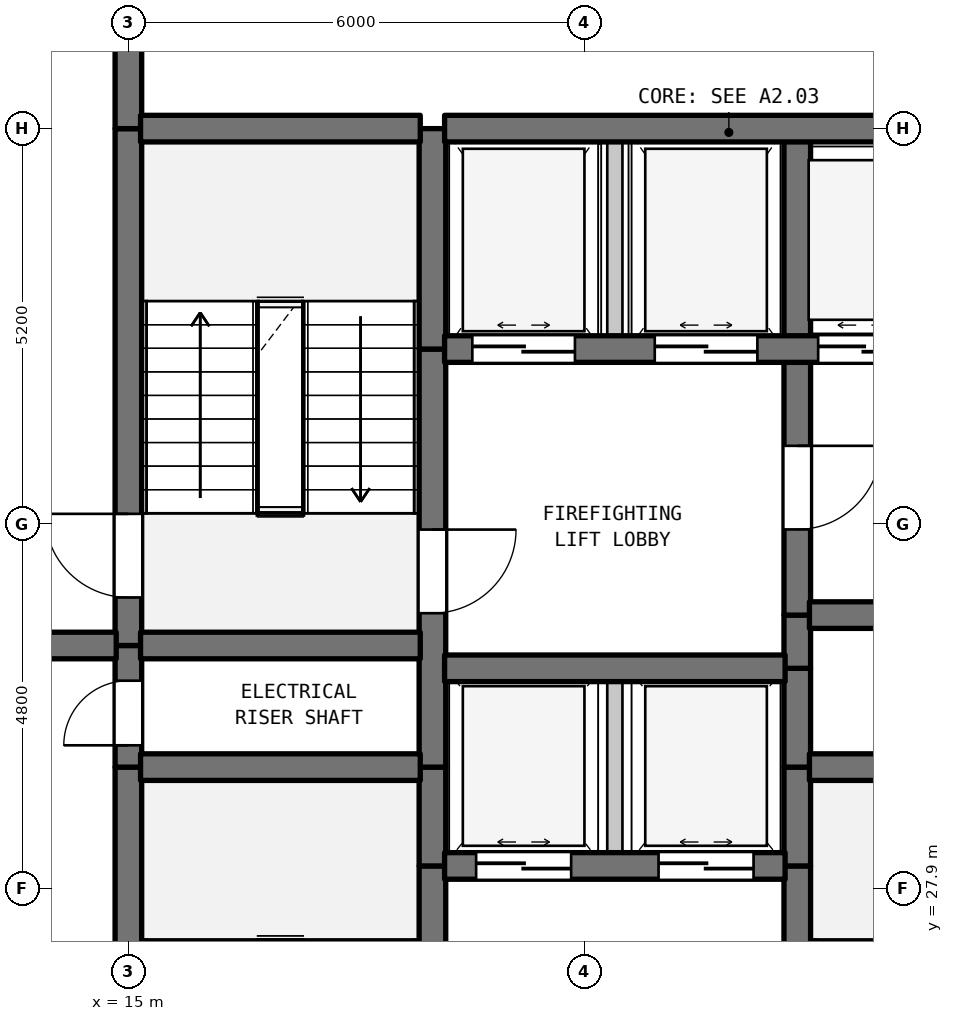
"""IFC4 building model, lengths in metres.
Left out: names, types, materials, properties, quantities, classifications, styles, units other than length and angle.
Written with IfcOpenShell. Run it as: python <this file> out.ifc"""

import sys

from ifc_helpers import new_model, si_unit, direction, frame, frame_2d, origin, place, context, subcontext, project, spatial, rectangle, extrude, element, fill, save


model = new_model("IFC4")
c1 = context("Model", 3, precision=1e-05, world=origin(), true_north=direction((0.0, 1.0)))
c2 = subcontext(c1, "Body", "Model", "MODEL_VIEW")
j1 = project(units=[si_unit("LENGTHUNIT", "METRE"), si_unit("PLANEANGLEUNIT", "RADIAN")], contexts=[c1])
p1 = place(None, origin())
s1 = spatial("IfcSite", under=j1, at=p1, CompositionType="ELEMENT")
p2 = place(p1, origin())
s2 = spatial("IfcBuilding", under=s1, at=p2, CompositionType="ELEMENT")
p3 = place(p2, origin())
s3 = spatial("IfcBuildingStorey", under=s2, at=p3, CompositionType="ELEMENT", Elevation=0.0)
p4 = place(p3, frame((15.0, 22.7, 0.0), z_axis=(0.0, 0.0, 1.0), x_axis=(0.0, 1.0, 0.0)))
e1 = element("IfcWall", 1, at=p4, inside=s3, PredefinedType="SHEAR", context=c2, shape_type="SweptSolid", body=[
    extrude(rectangle(XDim=6.8, YDim=0.35, at=frame_2d((3.4, 0.0))), origin(), (0.0, 0.0, 1.0), 6.17),
])
p5 = place(p3, frame((15.0, 29.5, 0.0), z_axis=(0.0, 0.0, 1.0), x_axis=(0.0, 1.0, 0.0)))
e2 = element("IfcWall", 2, at=p5, inside=s3, PredefinedType="SHEAR", context=c2, shape_type="SweptSolid", body=[
    extrude(rectangle(XDim=1.6, YDim=0.35, at=frame_2d((0.8, 0.0))), origin(), (0.0, 0.0, 1.0), 6.17),
])
p6 = place(p5, frame((0.287, 0.0, 0.0)))
e3 = element("IfcOpeningElement", 3, at=p6, cuts=e2, PredefinedType="OPENING", context=c2, shape_type="SweptSolid", body=[
    extrude(rectangle(XDim=0.85, YDim=2.1, at=frame_2d((0.425, 1.05))), frame((0.0, 0.185, 0.0), z_axis=(0.0, -1.0, 0.0), x_axis=(1.0, 0.0, 0.0)), (0.0, 0.0, 1.0), 0.37),
])
p7 = place(p3, frame((15.0, 31.1, 0.0), z_axis=(0.0, 0.0, 1.0), x_axis=(0.0, 1.0, 0.0)))
e4 = element("IfcWall", 4, at=p7, inside=s3, PredefinedType="SHEAR", context=c2, shape_type="SweptSolid", body=[
    extrude(rectangle(XDim=6.8, YDim=0.35, at=frame_2d((3.4, 0.0))), origin(), (0.0, 0.0, 1.0), 6.17),
])
p8 = place(p7, frame((0.632, 0.0, 0.0)))
e5 = element("IfcOpeningElement", 5, at=p8, cuts=e4, PredefinedType="OPENING", context=c2, shape_type="SweptSolid", body=[
    extrude(rectangle(XDim=1.1, YDim=2.15, at=frame_2d((0.55, 1.075))), frame((0.0, 0.185, 0.0), z_axis=(0.0, -1.0, 0.0), x_axis=(1.0, 0.0, 0.0)), (0.0, 0.0, 1.0), 0.37),
])
p9 = place(p3, frame((15.0, 37.9, 0.0), z_axis=(0.0, 0.0, 1.0), x_axis=(0.0, 1.0, 0.0)))
e6 = element("IfcWall", 6, at=p9, inside=s3, PredefinedType="SHEAR", context=c2, shape_type="SweptSolid", body=[
    extrude(rectangle(XDim=2.6, YDim=0.35, at=frame_2d((1.3, 0.0))), origin(), (0.0, 0.0, 1.0), 6.17),
])
p10 = place(p3, frame((19.0, 22.7, 0.0), z_axis=(0.0, 0.0, 1.0), x_axis=(0.0, 1.0, 0.0)))
e7 = element("IfcWall", 7, at=p10, inside=s3, PredefinedType="SHEAR", context=c2, shape_type="SweptSolid", body=[
    extrude(rectangle(XDim=5.5, YDim=0.35, at=frame_2d((2.75, 0.0))), origin(), (0.0, 0.0, 1.0), 6.17),
])
p11 = place(p10, frame((0.631, 0.0, 0.0)))
e8 = element("IfcOpeningElement", 8, at=p11, cuts=e7, PredefinedType="OPENING", context=c2, shape_type="SweptSolid", body=[
    extrude(rectangle(XDim=1.1, YDim=2.15, at=frame_2d((0.55, 1.075))), frame((0.0, 0.185, 0.0), z_axis=(0.0, -1.0, 0.0), x_axis=(1.0, 0.0, 0.0)), (0.0, 0.0, 1.0), 0.37),
])
p12 = place(p3, frame((19.0, 28.2, 0.0), z_axis=(0.0, 0.0, 1.0), x_axis=(0.0, 1.0, 0.0)))
e9 = element("IfcWall", 9, at=p12, inside=s3, PredefinedType="SHEAR", context=c2, shape_type="SweptSolid", body=[
    extrude(rectangle(XDim=1.3, YDim=0.35, at=frame_2d((0.65, 0.0))), origin(), (0.0, 0.0, 1.0), 6.17),
])
p13 = place(p3, frame((19.0, 29.5, 0.0), z_axis=(0.0, 0.0, 1.0), x_axis=(0.0, 1.0, 0.0)))
e10 = element("IfcWall", 10, at=p13, inside=s3, PredefinedType="SHEAR", context=c2, shape_type="SweptSolid", body=[
    extrude(rectangle(XDim=5.5, YDim=0.35, at=frame_2d((2.75, 0.0))), origin(), (0.0, 0.0, 1.0), 6.17),
])
p14 = place(p13, frame((2.025, 0.0, 0.0)))
e11 = element("IfcOpeningElement", 11, at=p14, cuts=e10, PredefinedType="OPENING", context=c2, shape_type="SweptSolid", body=[
    extrude(rectangle(XDim=1.1, YDim=2.15, at=frame_2d((0.55, 1.075))), frame((0.0, 0.185, 0.0), z_axis=(0.0, -1.0, 0.0), x_axis=(1.0, 0.0, 0.0)), (0.0, 0.0, 1.0), 0.37),
])
p15 = place(p3, frame((19.0, 35.0, 0.0), z_axis=(0.0, 0.0, 1.0), x_axis=(0.0, 1.0, 0.0)))
e12 = element("IfcWall", 12, at=p15, inside=s3, PredefinedType="SHEAR", context=c2, shape_type="SweptSolid", body=[
    extrude(rectangle(XDim=2.9, YDim=0.35, at=frame_2d((1.45, 0.0))), origin(), (0.0, 0.0, 1.0), 6.17),
])
p16 = place(p3, frame((21.4, 28.2, 0.0), z_axis=(0.0, 0.0, 1.0), x_axis=(0.0, 1.0, 0.0)))
e13 = element("IfcWall", 13, at=p16, inside=s3, PredefinedType="STANDARD", context=c2, shape_type="SweptSolid", body=[
    extrude(rectangle(XDim=2.6, YDim=0.2, at=frame_2d((1.3, 0.0))), origin(), (0.0, 0.0, 1.0), 6.17),
])
p17 = place(p3, frame((21.4, 35.0, 0.0), z_axis=(0.0, 0.0, 1.0), x_axis=(0.0, 1.0, 0.0)))
e14 = element("IfcWall", 14, at=p17, inside=s3, PredefinedType="STANDARD", context=c2, shape_type="SweptSolid", body=[
    extrude(rectangle(XDim=2.9, YDim=0.2, at=frame_2d((1.45, 0.0))), origin(), (0.0, 0.0, 1.0), 6.17),
])
p18 = place(p3, frame((23.8, 22.7, 0.0), z_axis=(0.0, 0.0, 1.0), x_axis=(0.0, 1.0, 0.0)))
e15 = element("IfcWall", 15, at=p18, inside=s3, PredefinedType="SHEAR", context=c2, shape_type="SweptSolid", body=[
    extrude(rectangle(XDim=5.5, YDim=0.35, at=frame_2d((2.75, 0.0))), origin(), (0.0, 0.0, 1.0), 6.17),
])
p19 = place(p18, frame((0.235, 0.0, 0.0)))
e16 = element("IfcOpeningElement", 16, at=p19, cuts=e15, PredefinedType="OPENING", context=c2, shape_type="SweptSolid", body=[
    extrude(rectangle(XDim=1.1, YDim=2.15, at=frame_2d((0.55, 1.075))), frame((0.0, 0.185, 0.0), z_axis=(0.0, -1.0, 0.0), x_axis=(1.0, 0.0, 0.0)), (0.0, 0.0, 1.0), 0.37),
])
for number, where, z_axis, x_axis in (
    (17, (23.8, 28.2, 0.0), (0.0, 0.0, 1.0), (0.0, 1.0, 0.0)),
    (18, (23.8, 29.5, 0.0), (0.0, 0.0, 1.0), (0.0, 1.0, 0.0)),
):
    element("IfcWall", number, at=place(p3, frame(where, z_axis=z_axis, x_axis=x_axis)), inside=s3, PredefinedType="SHEAR", context=c2, shape_type="SweptSolid", body=[
        extrude(rectangle(XDim=1.3, YDim=0.35, at=frame_2d((0.65, 0.0))), origin(), (0.0, 0.0, 1.0), 6.17),
    ])
p20 = place(p3, frame((23.8, 30.8, 0.0), z_axis=(0.0, 0.0, 1.0), x_axis=(0.0, 1.0, 0.0)))
e19 = element("IfcWall", 19, at=p20, inside=s3, PredefinedType="SHEAR", context=c2, shape_type="SweptSolid", body=[
    extrude(rectangle(XDim=0.7, YDim=0.35, at=frame_2d((0.35, 0.0))), origin(), (0.0, 0.0, 1.0), 6.17),
])
p21 = place(p3, frame((23.8, 31.5, 0.0), z_axis=(0.0, 0.0, 1.0), x_axis=(0.0, 1.0, 0.0)))
e20 = element("IfcWall", 20, at=p21, inside=s3, PredefinedType="SHEAR", context=c2, shape_type="SweptSolid", body=[
    extrude(rectangle(XDim=3.5, YDim=0.35, at=frame_2d((1.75, 0.0))), origin(), (0.0, 0.0, 1.0), 6.17),
])
p22 = place(p21, frame((1.127, 0.0, 0.0)))
e21 = element("IfcOpeningElement", 21, at=p22, cuts=e20, PredefinedType="OPENING", context=c2, shape_type="SweptSolid", body=[
    extrude(rectangle(XDim=1.1, YDim=2.15, at=frame_2d((0.55, 1.075))), frame((0.0, 0.185, 0.0), z_axis=(0.0, -1.0, 0.0), x_axis=(1.0, 0.0, 0.0)), (0.0, 0.0, 1.0), 0.37),
])
p23 = place(p3, frame((23.8, 35.0, 0.0), z_axis=(0.0, 0.0, 1.0), x_axis=(0.0, 1.0, 0.0)))
e22 = element("IfcWall", 22, at=p23, inside=s3, PredefinedType="SHEAR", context=c2, shape_type="SweptSolid", body=[
    extrude(rectangle(XDim=2.9, YDim=0.35, at=frame_2d((1.45, 0.0))), origin(), (0.0, 0.0, 1.0), 6.17),
])
p24 = place(p3, frame((19.16, 28.2, 0.0), z_axis=(0.0, 0.0, 1.0), x_axis=(1.0, 0.0, 0.0)))
e23 = element("IfcWall", 23, at=p24, inside=s3, PredefinedType="SHEAR", context=c2, shape_type="SweptSolid", body=[
    extrude(rectangle(XDim=4.48, YDim=0.35, at=frame_2d((2.24, 0.0))), origin(), (0.0, 0.0, 1.0), 6.17),
])
p25 = place(p24, frame((0.415, 0.0, 0.0)))
e24 = element("IfcOpeningElement", 24, at=p25, cuts=e23, PredefinedType="OPENING", context=c2, shape_type="SweptSolid", body=[
    extrude(rectangle(XDim=1.25, YDim=2.2, at=frame_2d((0.625, 1.1))), frame((0.0, 0.185, 0.0), z_axis=(0.0, -1.0, 0.0), x_axis=(1.0, 0.0, 0.0)), (0.0, 0.0, 1.0), 0.37),
])
p26 = place(p24, frame((2.815, 0.0, 0.0)))
e25 = element("IfcOpeningElement", 25, at=p26, cuts=e23, PredefinedType="OPENING", context=c2, shape_type="SweptSolid", body=[
    extrude(rectangle(XDim=1.25, YDim=2.2, at=frame_2d((0.625, 1.1))), frame((0.0, 0.185, 0.0), z_axis=(0.0, -1.0, 0.0), x_axis=(1.0, 0.0, 0.0)), (0.0, 0.0, 1.0), 0.37),
])
p27 = place(p3, frame((15.16, 29.5, 0.0), z_axis=(0.0, 0.0, 1.0), x_axis=(1.0, 0.0, 0.0)))
e26 = element("IfcWall", 26, at=p27, inside=s3, PredefinedType="SHEAR", context=c2, shape_type="SweptSolid", body=[
    extrude(rectangle(XDim=3.68, YDim=0.35, at=frame_2d((1.84, 0.0))), origin(), (0.0, 0.0, 1.0), 6.17),
])
p28 = place(p3, frame((23.96, 29.5, 0.0), z_axis=(0.0, 0.0, 1.0), x_axis=(1.0, 0.0, 0.0)))
e27 = element("IfcWall", 27, at=p28, inside=s3, PredefinedType="SHEAR", context=c2, shape_type="SweptSolid", body=[
    extrude(rectangle(XDim=3.18, YDim=0.35, at=frame_2d((1.59, 0.0))), origin(), (0.0, 0.0, 1.0), 6.17),
])
p29 = place(p3, frame((19.16, 30.8, 0.0), z_axis=(0.0, 0.0, 1.0), x_axis=(1.0, 0.0, 0.0)))
e28 = element("IfcWall", 28, at=p29, inside=s3, PredefinedType="SHEAR", context=c2, shape_type="SweptSolid", body=[
    extrude(rectangle(XDim=4.48, YDim=0.35, at=frame_2d((2.24, 0.0))), origin(), (0.0, 0.0, 1.0), 6.17),
])
p30 = place(p3, frame((11.685, 31.1, 0.0), z_axis=(0.0, 0.0, 1.0), x_axis=(1.0, 0.0, 0.0)))
e29 = element("IfcWall", 29, at=p30, inside=s3, PredefinedType="SHEAR", context=c2, shape_type="SweptSolid", body=[
    extrude(rectangle(XDim=3.155, YDim=0.35, at=frame_2d((1.578, 0.0))), origin(), (0.0, 0.0, 1.0), 6.17),
])
p31 = place(p3, frame((15.16, 31.1, 0.0), z_axis=(0.0, 0.0, 1.0), x_axis=(1.0, 0.0, 0.0)))
e30 = element("IfcWall", 30, at=p31, inside=s3, PredefinedType="SHEAR", context=c2, shape_type="SweptSolid", body=[
    extrude(rectangle(XDim=3.68, YDim=0.35, at=frame_2d((1.84, 0.0))), origin(), (0.0, 0.0, 1.0), 6.17),
])
p32 = place(p3, frame((23.96, 31.5, 0.0), z_axis=(0.0, 0.0, 1.0), x_axis=(1.0, 0.0, 0.0)))
e31 = element("IfcWall", 31, at=p32, inside=s3, PredefinedType="SHEAR", context=c2, shape_type="SweptSolid", body=[
    extrude(rectangle(XDim=3.18, YDim=0.35, at=frame_2d((1.59, 0.0))), origin(), (0.0, 0.0, 1.0), 6.17),
])
p33 = place(p32, frame((1.094, 0.0, 0.0)))
e32 = element("IfcOpeningElement", 32, at=p33, cuts=e31, PredefinedType="OPENING", context=c2, shape_type="SweptSolid", body=[
    extrude(rectangle(XDim=0.85, YDim=2.1, at=frame_2d((0.425, 1.05))), frame((0.0, 0.185, 0.0), z_axis=(0.0, -1.0, 0.0), x_axis=(1.0, 0.0, 0.0)), (0.0, 0.0, 1.0), 0.37),
])
p34 = place(p3, frame((19.16, 35.0, 0.0), z_axis=(0.0, 0.0, 1.0), x_axis=(1.0, 0.0, 0.0)))
e33 = element("IfcWall", 33, at=p34, inside=s3, PredefinedType="SHEAR", context=c2, shape_type="SweptSolid", body=[
    extrude(rectangle(XDim=11.48, YDim=0.35, at=frame_2d((5.74, 0.0))), origin(), (0.0, 0.0, 1.0), 6.17),
])
p35 = place(p34, frame((0.365, 0.0, 0.0)))
e34 = element("IfcOpeningElement", 34, at=p35, cuts=e33, PredefinedType="OPENING", context=c2, shape_type="SweptSolid", body=[
    extrude(rectangle(XDim=1.35, YDim=2.2, at=frame_2d((0.675, 1.1))), frame((0.0, 0.185, 0.0), z_axis=(0.0, -1.0, 0.0), x_axis=(1.0, 0.0, 0.0)), (0.0, 0.0, 1.0), 0.37),
])
p36 = place(p34, frame((2.765, 0.0, 0.0)))
e35 = element("IfcOpeningElement", 35, at=p36, cuts=e33, PredefinedType="OPENING", context=c2, shape_type="SweptSolid", body=[
    extrude(rectangle(XDim=1.35, YDim=2.2, at=frame_2d((0.675, 1.1))), frame((0.0, 0.185, 0.0), z_axis=(0.0, -1.0, 0.0), x_axis=(1.0, 0.0, 0.0)), (0.0, 0.0, 1.0), 0.37),
])
p37 = place(p34, frame((4.915, 0.0, 0.0)))
e36 = element("IfcOpeningElement", 36, at=p37, cuts=e33, PredefinedType="OPENING", context=c2, shape_type="SweptSolid", body=[
    extrude(rectangle(XDim=1.2, YDim=2.2, at=frame_2d((0.6, 1.1))), frame((0.0, 0.185, 0.0), z_axis=(0.0, -1.0, 0.0), x_axis=(1.0, 0.0, 0.0)), (0.0, 0.0, 1.0), 0.37),
])
p38 = place(p34, frame((6.665, 0.0, 0.0)))
e37 = element("IfcOpeningElement", 37, at=p38, cuts=e33, PredefinedType="OPENING", context=c2, shape_type="SweptSolid", body=[
    extrude(rectangle(XDim=1.2, YDim=2.2, at=frame_2d((0.6, 1.1))), frame((0.0, 0.185, 0.0), z_axis=(0.0, -1.0, 0.0), x_axis=(1.0, 0.0, 0.0)), (0.0, 0.0, 1.0), 0.37),
])
p39 = place(p34, frame((8.415, 0.0, 0.0)))
e38 = element("IfcOpeningElement", 38, at=p39, cuts=e33, PredefinedType="OPENING", context=c2, shape_type="SweptSolid", body=[
    extrude(rectangle(XDim=1.2, YDim=2.2, at=frame_2d((0.6, 1.1))), frame((0.0, 0.185, 0.0), z_axis=(0.0, -1.0, 0.0), x_axis=(1.0, 0.0, 0.0)), (0.0, 0.0, 1.0), 0.37),
])
p40 = place(p34, frame((10.16, 0.0, 0.0)))
e39 = element("IfcOpeningElement", 39, at=p40, cuts=e33, PredefinedType="OPENING", context=c2, shape_type="SweptSolid", body=[
    extrude(rectangle(XDim=1.2, YDim=2.2, at=frame_2d((0.6, 1.1))), frame((0.0, 0.185, 0.0), z_axis=(0.0, -1.0, 0.0), x_axis=(1.0, 0.0, 0.0)), (0.0, 0.0, 1.0), 0.37),
])
p41 = place(p3, frame((15.16, 37.9, 0.0), z_axis=(0.0, 0.0, 1.0), x_axis=(1.0, 0.0, 0.0)))
e40 = element("IfcWall", 40, at=p41, inside=s3, PredefinedType="SHEAR", context=c2, shape_type="SweptSolid", body=[
    extrude(rectangle(XDim=3.68, YDim=0.35, at=frame_2d((1.84, 0.0))), origin(), (0.0, 0.0, 1.0), 6.17),
])
p42 = place(p3, frame((19.16, 37.9, 0.0), z_axis=(0.0, 0.0, 1.0), x_axis=(1.0, 0.0, 0.0)))
e41 = element("IfcWall", 41, at=p42, inside=s3, PredefinedType="SHEAR", context=c2, shape_type="SweptSolid", body=[
    extrude(rectangle(XDim=11.48, YDim=0.35, at=frame_2d((5.74, 0.0))), origin(), (0.0, 0.0, 1.0), 6.17),
])
p43 = place(p6, origin())
e42 = element("IfcDoor", 42, at=p43, inside=s3, OperationType="SINGLE_SWING_LEFT", PredefinedType="DOOR", context=c2, shape_type="SweptSolid", body=[
    extrude(rectangle(XDim=0.85, YDim=2.1, at=frame_2d((0.425, 1.05))), frame((0.0, 0.025, 0.0), z_axis=(0.0, -1.0, 0.0), x_axis=(1.0, 0.0, 0.0)), (0.0, 0.0, 1.0), 0.05),
])
fill(e3, e42)
p44 = place(p8, origin())
e43 = element("IfcDoor", 43, at=p44, inside=s3, OperationType="SINGLE_SWING_RIGHT", PredefinedType="DOOR", context=c2, shape_type="SweptSolid", body=[
    extrude(rectangle(XDim=1.1, YDim=2.15, at=frame_2d((0.55, 1.075))), frame((0.0, 0.025, 0.0), z_axis=(0.0, -1.0, 0.0), x_axis=(1.0, 0.0, 0.0)), (0.0, 0.0, 1.0), 0.05),
])
fill(e5, e43)
p45 = place(p14, frame((1.1, 0.0, 0.0), z_axis=(0.0, 0.0, 1.0), x_axis=(-1.0, 0.0, 0.0)))
e44 = element("IfcDoor", 44, at=p45, inside=s3, OperationType="SINGLE_SWING_RIGHT", PredefinedType="DOOR", context=c2, shape_type="SweptSolid", body=[
    extrude(rectangle(XDim=1.1, YDim=2.15, at=frame_2d((0.55, 1.075))), frame((0.0, 0.025, 0.0), z_axis=(0.0, -1.0, 0.0), x_axis=(1.0, 0.0, 0.0)), (0.0, 0.0, 1.0), 0.05),
])
fill(e11, e44)
p46 = place(p22, frame((1.1, 0.0, 0.0), z_axis=(0.0, 0.0, 1.0), x_axis=(-1.0, 0.0, 0.0)))
e45 = element("IfcDoor", 45, at=p46, inside=s3, OperationType="SINGLE_SWING_RIGHT", PredefinedType="DOOR", context=c2, shape_type="SweptSolid", body=[
    extrude(rectangle(XDim=1.1, YDim=2.15, at=frame_2d((0.55, 1.075))), frame((0.0, 0.025, 0.0), z_axis=(0.0, -1.0, 0.0), x_axis=(1.0, 0.0, 0.0)), (0.0, 0.0, 1.0), 0.05),
])
fill(e21, e45)
p47 = place(p25, origin())
e46 = element("IfcDoor", 46, at=p47, inside=s3, OperationType="DOUBLE_DOOR_SLIDING", PredefinedType="DOOR", context=c2, shape_type="SweptSolid", body=[
    extrude(rectangle(XDim=1.25, YDim=2.2, at=frame_2d((0.625, 1.1))), frame((0.0, 0.025, 0.0), z_axis=(0.0, -1.0, 0.0), x_axis=(1.0, 0.0, 0.0)), (0.0, 0.0, 1.0), 0.05),
])
fill(e24, e46)
p48 = place(p26, origin())
e47 = element("IfcDoor", 47, at=p48, inside=s3, OperationType="DOUBLE_DOOR_SLIDING", PredefinedType="DOOR", context=c2, shape_type="SweptSolid", body=[
    extrude(rectangle(XDim=1.25, YDim=2.2, at=frame_2d((0.625, 1.1))), frame((0.0, 0.025, 0.0), z_axis=(0.0, -1.0, 0.0), x_axis=(1.0, 0.0, 0.0)), (0.0, 0.0, 1.0), 0.05),
])
fill(e25, e47)
p49 = place(p35, origin())
e48 = element("IfcDoor", 48, at=p49, inside=s3, OperationType="DOUBLE_DOOR_SLIDING", PredefinedType="DOOR", context=c2, shape_type="SweptSolid", body=[
    extrude(rectangle(XDim=1.35, YDim=2.2, at=frame_2d((0.675, 1.1))), frame((0.0, 0.025, 0.0), z_axis=(0.0, -1.0, 0.0), x_axis=(1.0, 0.0, 0.0)), (0.0, 0.0, 1.0), 0.05),
])
fill(e34, e48)
p50 = place(p36, origin())
e49 = element("IfcDoor", 49, at=p50, inside=s3, OperationType="DOUBLE_DOOR_SLIDING", PredefinedType="DOOR", context=c2, shape_type="SweptSolid", body=[
    extrude(rectangle(XDim=1.35, YDim=2.2, at=frame_2d((0.675, 1.1))), frame((0.0, 0.025, 0.0), z_axis=(0.0, -1.0, 0.0), x_axis=(1.0, 0.0, 0.0)), (0.0, 0.0, 1.0), 0.05),
])
fill(e35, e49)
p51 = place(p37, origin())
e50 = element("IfcDoor", 50, at=p51, inside=s3, OperationType="DOUBLE_DOOR_SLIDING", PredefinedType="DOOR", context=c2, shape_type="SweptSolid", body=[
    extrude(rectangle(XDim=1.2, YDim=2.2, at=frame_2d((0.6, 1.1))), frame((0.0, 0.025, 0.0), z_axis=(0.0, -1.0, 0.0), x_axis=(1.0, 0.0, 0.0)), (0.0, 0.0, 1.0), 0.05),
])
fill(e36, e50)
save(model, sys.argv[1])
